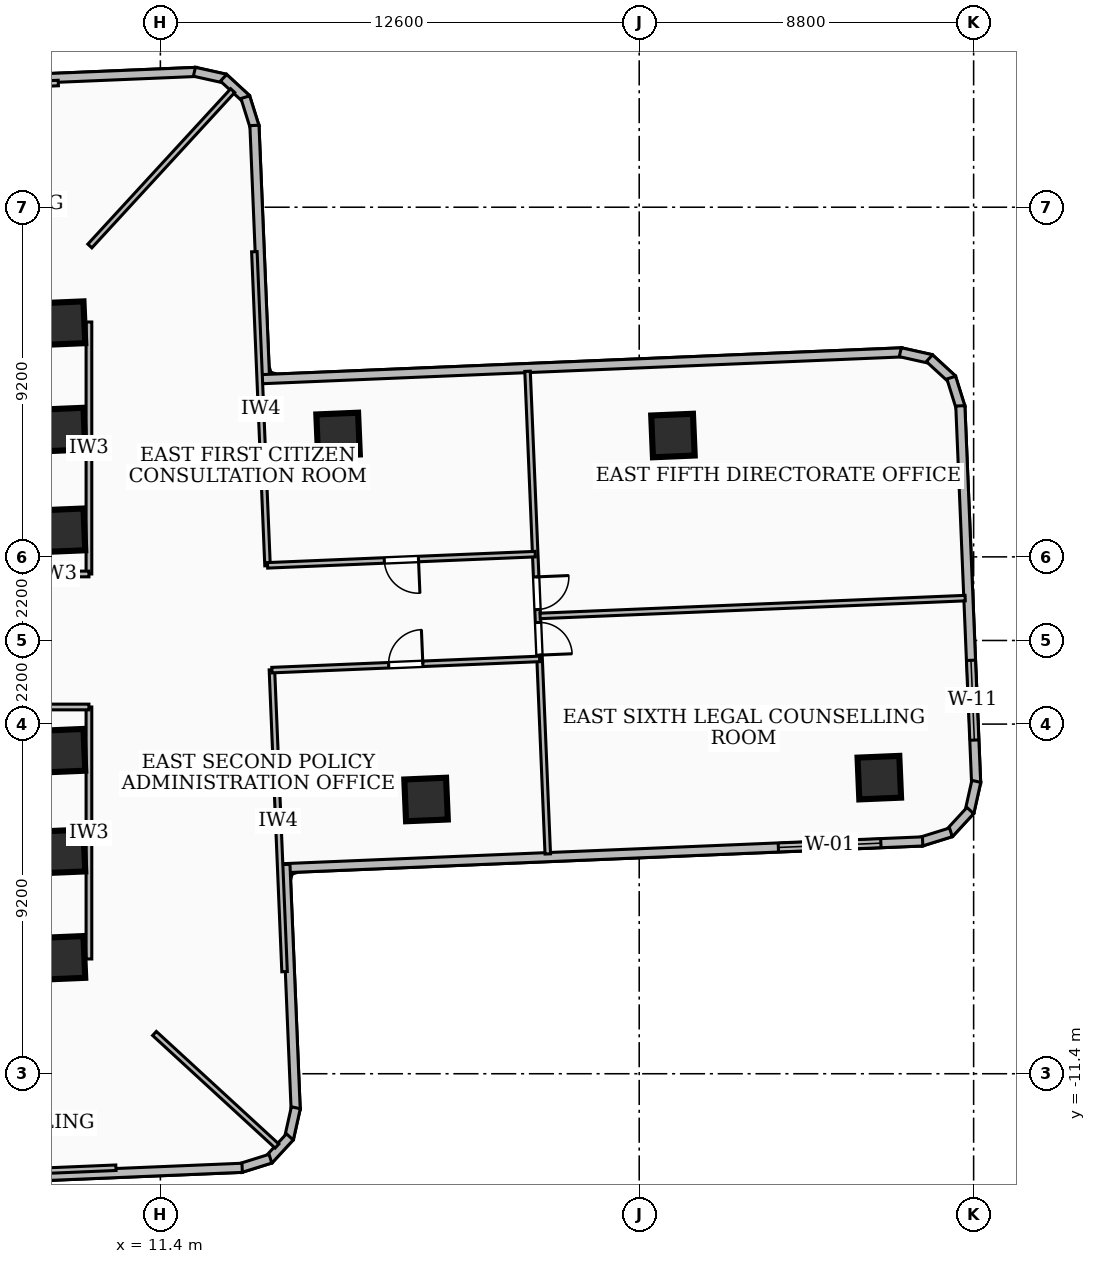
"""IFC4 building model, lengths in metres.
Left out: names, types, materials, properties, quantities, classifications, styles, units other than length and angle.
Written with IfcOpenShell. Run it as: python <this file> out.ifc"""

import sys

from ifc_helpers import new_model, si_unit, direction, frame, frame_2d, origin, origin_2d, place, context, subcontext, project, spatial, rectangle, extrude, element, fill, save


model = new_model("IFC4")
c1 = context("Model", 3, precision=1e-05, world=origin(), true_north=direction((0.0, 1.0)))
c2 = subcontext(c1, "Body", "Model", "MODEL_VIEW")
j1 = project(units=[si_unit("LENGTHUNIT", "METRE"), si_unit("PLANEANGLEUNIT", "RADIAN")], contexts=[c1])
p1 = place(None, origin())
s1 = spatial("IfcSite", under=j1, at=p1, CompositionType="ELEMENT")
p2 = place(p1, origin())
s2 = spatial("IfcBuilding", under=s1, at=p2, CompositionType="ELEMENT")
p3 = place(p2, frame((0.0, 0.0, 46.08)))
s3 = spatial("IfcBuildingStorey", under=s2, at=p3, CompositionType="ELEMENT", Elevation=46.08)
for number, where, z_axis, x_axis in (
    (1, (-8.78, 8.585, 0.0), (0.0, 0.0, 1.0), (1.0, 0.0, 0.0)),
    (2, (8.78, -8.585, 0.0), (0.0, 0.0, 1.0), (-1.0, 0.0, 0.0)),
):
    element("IfcWall", number, at=place(p3, frame(where, z_axis=z_axis, x_axis=x_axis)), inside=s3, PredefinedType="SHEAR", context=c2, shape_type="SweptSolid", body=[
        extrude(rectangle(XDim=17.56, YDim=0.55, at=frame_2d((8.78, 0.0))), origin(), (0.0, 0.0, 1.0), 3.32),
    ])
for number, where, z_axis, x_axis in (
    (3, (8.85, -5.55, 0.0), (0.0, 0.0, 1.0), (0.999, 0.042, 0.0)),
    (4, (8.85, -2.9, 0.0), (0.0, 0.0, 1.0), (0.999, 0.042, 0.0)),
    (5, (8.85, 2.9, 0.0), (0.0, 0.0, 1.0), (0.999, 0.042, 0.0)),
    (6, (8.85, 5.55, 0.0), (0.0, 0.0, 1.0), (0.999, 0.042, 0.0)),
    (7, (8.85, -8.35, 0.0), (0.0, 0.0, 1.0), (0.999, 0.042, 0.0)),
    (8, (8.85, 8.35, 0.0), (0.0, 0.0, 1.0), (0.999, 0.042, 0.0)),
    (9, (18.391, -4.184, 0.0), (0.0, 0.0, 1.0), (0.999, 0.042, 0.0)),
    (10, (16.076, 5.421, 0.0), (0.0, 0.0, 1.0), (0.999, 0.042, 0.0)),
    (11, (30.318, -3.609, 0.0), (0.0, 0.0, 1.0), (0.999, 0.042, 0.0)),
    (12, (24.888, 5.393, 0.0), (0.0, 0.0, 1.0), (0.999, 0.042, 0.0)),
):
    element("IfcColumn", number, at=place(p3, frame(where, z_axis=z_axis, x_axis=x_axis)), inside=s3, PredefinedType="COLUMN", context=c2, shape_type="SweptSolid", body=[
        extrude(rectangle(XDim=1.1, YDim=1.1, at=origin_2d()), origin(), (0.0, 0.0, 1.0), 3.6),
    ])
p4 = place(p3, frame((5.894, 14.69, 0.0), z_axis=(0.0, 0.0, 1.0), x_axis=(0.999124860845, 0.041827173477, 0.0)))
e13 = element("IfcWall", 13, at=p4, inside=s3, PredefinedType="SOLIDWALL", context=c2, shape_type="SweptSolid", body=[
    extrude(rectangle(XDim=6.456, YDim=0.24, at=frame_2d((3.228, 0.0))), origin(), (0.0, 0.0, 1.0), 2.401),
])
p5 = place(p3, frame((12.295, 14.964, 0.0), z_axis=(0.0, 0.0, 1.0), x_axis=(0.976089939158, -0.21736704137, 0.0)))
e14 = element("IfcWall", 14, at=p5, inside=s3, PredefinedType="SOLIDWALL", context=c2, shape_type="SweptSolid", body=[
    extrude(rectangle(XDim=0.829, YDim=0.24, at=frame_2d((0.415, 0.0))), origin(), (0.0, 0.0, 1.0), 3.32),
])
p6 = place(p3, frame((13.062, 14.806, 0.0), z_axis=(0.0, 0.0, 1.0), x_axis=(0.735344259965, -0.677693750404, 0.0)))
e15 = element("IfcWall", 15, at=p6, inside=s3, PredefinedType="SOLIDWALL", context=c2, shape_type="SweptSolid", body=[
    extrude(rectangle(XDim=0.813, YDim=0.24, at=frame_2d((0.406, 0.0))), origin(), (0.0, 0.0, 1.0), 3.32),
])
p7 = place(p3, frame((13.635, 14.296, 0.0), z_axis=(0.0, 0.0, 1.0), x_axis=(0.298542680168, -0.954396284631, 0.0)))
e16 = element("IfcWall", 16, at=p7, inside=s3, PredefinedType="SOLIDWALL", context=c2, shape_type="SweptSolid", body=[
    extrude(rectangle(XDim=0.831, YDim=0.24, at=frame_2d((0.416, 0.0))), origin(), (0.0, 0.0, 1.0), 3.32),
])
p8 = place(p3, frame((13.875, 13.552, 0.0), z_axis=(0.0, 0.0, 1.0), x_axis=(0.041765444226, -0.999127443157, 0.0)))
e17 = element("IfcWall", 17, at=p8, inside=s3, PredefinedType="SOLIDWALL", context=c2, shape_type="SweptSolid", body=[
    extrude(rectangle(XDim=6.775, YDim=0.24, at=frame_2d((3.387, 0.0))), origin(), (0.0, 0.0, 1.0), 2.624),
])
p9 = place(p3, frame((14.058, 6.875, 0.0), z_axis=(0.0, 0.0, 1.0), x_axis=(0.999124376175, 0.04183874918, 0.0)))
e18 = element("IfcWall", 18, at=p9, inside=s3, PredefinedType="SOLIDWALL", context=c2, shape_type="SweptSolid", body=[
    extrude(rectangle(XDim=16.876, YDim=0.24, at=frame_2d((8.438, 0.0))), origin(), (0.0, 0.0, 1.0), 2.624),
])
p10 = place(p3, frame((30.87, 7.585, 0.0), z_axis=(0.0, 0.0, 1.0), x_axis=(0.976138507006, -0.217148831773, 0.0)))
e19 = element("IfcWall", 19, at=p10, inside=s3, PredefinedType="SOLIDWALL", context=c2, shape_type="SweptSolid", body=[
    extrude(rectangle(XDim=0.829, YDim=0.24, at=frame_2d((0.414, 0.0))), origin(), (0.0, 0.0, 1.0), 3.32),
])
p11 = place(p3, frame((31.637, 7.427, 0.0), z_axis=(0.0, 0.0, 1.0), x_axis=(0.73603262681, -0.676946063044, 0.0)))
e20 = element("IfcWall", 20, at=p11, inside=s3, PredefinedType="SOLIDWALL", context=c2, shape_type="SweptSolid", body=[
    extrude(rectangle(XDim=0.814, YDim=0.24, at=frame_2d((0.407, 0.0))), origin(), (0.0, 0.0, 1.0), 3.32),
])
p12 = place(p3, frame((32.211, 6.917, 0.0), z_axis=(0.0, 0.0, 1.0), x_axis=(0.297805793488, -0.954626476359, 0.0)))
e21 = element("IfcWall", 21, at=p12, inside=s3, PredefinedType="SOLIDWALL", context=c2, shape_type="SweptSolid", body=[
    extrude(rectangle(XDim=0.83, YDim=0.24, at=frame_2d((0.415, 0.0))), origin(), (0.0, 0.0, 1.0), 3.32),
])
p13 = place(p3, frame((32.45, 6.174, 0.0), z_axis=(0.0, 0.0, 1.0), x_axis=(0.041857368543, -0.999123596308, 0.0)))
e22 = element("IfcWall", 22, at=p13, inside=s3, PredefinedType="SOLIDWALL", context=c2, shape_type="SweptSolid", body=[
    extrude(rectangle(XDim=9.939, YDim=0.24, at=frame_2d((4.969, 0.0))), origin(), (0.0, 0.0, 1.0), 3.32),
])
p14 = place(p13, frame((6.702, 0.0, 0.85)))
e23 = element("IfcOpeningElement", 23, at=p14, cuts=e22, PredefinedType="OPENING", context=c2, shape_type="SweptSolid", body=[
    extrude(rectangle(XDim=2.1, YDim=1.6, at=frame_2d((1.05, 0.8))), frame((0.0, 0.13, 0.0), z_axis=(0.0, -1.0, 0.0), x_axis=(1.0, 0.0, 0.0)), (0.0, 0.0, 1.0), 0.26),
])
p15 = place(p3, frame((32.87, -3.707, 0.0), z_axis=(0.0, 0.0, 1.0), x_axis=(-0.21711735544, -0.976145508604, 0.0)))
e24 = element("IfcWall", 24, at=p15, inside=s3, PredefinedType="SOLIDWALL", context=c2, shape_type="SweptSolid", body=[
    extrude(rectangle(XDim=0.83, YDim=0.24, at=frame_2d((0.415, 0.0))), origin(), (0.0, 0.0, 1.0), 3.32),
])
p16 = place(p3, frame((32.712, -4.475, 0.0), z_axis=(0.0, 0.0, 1.0), x_axis=(-0.677693750404, -0.735344259965, 0.0)))
e25 = element("IfcWall", 25, at=p16, inside=s3, PredefinedType="SOLIDWALL", context=c2, shape_type="SweptSolid", body=[
    extrude(rectangle(XDim=0.813, YDim=0.24, at=frame_2d((0.406, 0.0))), origin(), (0.0, 0.0, 1.0), 3.32),
])
p17 = place(p3, frame((32.202, -5.048, 0.0), z_axis=(0.0, 0.0, 1.0), x_axis=(-0.954814146828, -0.297203541393, 0.0)))
e26 = element("IfcWall", 26, at=p17, inside=s3, PredefinedType="SOLIDWALL", context=c2, shape_type="SweptSolid", body=[
    extrude(rectangle(XDim=0.831, YDim=0.24, at=frame_2d((0.415, 0.0))), origin(), (0.0, 0.0, 1.0), 3.32),
])
p18 = place(p3, frame((31.458, -5.287, 0.0), z_axis=(0.0, 0.0, 1.0), x_axis=(-0.999122484842, -0.041883890494, 0.0)))
e27 = element("IfcWall", 27, at=p18, inside=s3, PredefinedType="SOLIDWALL", context=c2, shape_type="SweptSolid", body=[
    extrude(rectangle(XDim=16.875, YDim=0.24, at=frame_2d((8.438, 0.0))), origin(), (0.0, 0.0, 1.0), 3.32),
])
p19 = place(p18, frame((1.1, 0.0, 0.85)))
e28 = element("IfcOpeningElement", 28, at=p19, cuts=e27, PredefinedType="OPENING", context=c2, shape_type="SweptSolid", body=[
    extrude(rectangle(XDim=2.7, YDim=2.1, at=frame_2d((1.35, 1.05))), frame((0.0, 0.13, 0.0), z_axis=(0.0, -1.0, 0.0), x_axis=(1.0, 0.0, 0.0)), (0.0, 0.0, 1.0), 0.26),
])
p20 = place(p3, frame((14.69, -5.894, 0.0), z_axis=(0.0, 0.0, 1.0), x_axis=(0.041827173477, -0.999124860845, 0.0)))
e29 = element("IfcWall", 29, at=p20, inside=s3, PredefinedType="SOLIDWALL", context=c2, shape_type="SweptSolid", body=[
    extrude(rectangle(XDim=6.456, YDim=0.24, at=frame_2d((3.228, 0.0))), origin(), (0.0, 0.0, 1.0), 3.32),
])
p21 = place(p3, frame((14.964, -12.295, 0.0), z_axis=(0.0, 0.0, 1.0), x_axis=(-0.21736704137, -0.976089939158, 0.0)))
e30 = element("IfcWall", 30, at=p21, inside=s3, PredefinedType="SOLIDWALL", context=c2, shape_type="SweptSolid", body=[
    extrude(rectangle(XDim=0.829, YDim=0.24, at=frame_2d((0.415, 0.0))), origin(), (0.0, 0.0, 1.0), 3.32),
])
p22 = place(p3, frame((14.806, -13.062, 0.0), z_axis=(0.0, 0.0, 1.0), x_axis=(-0.677693750404, -0.735344259965, 0.0)))
e31 = element("IfcWall", 31, at=p22, inside=s3, PredefinedType="SOLIDWALL", context=c2, shape_type="SweptSolid", body=[
    extrude(rectangle(XDim=0.813, YDim=0.24, at=frame_2d((0.406, 0.0))), origin(), (0.0, 0.0, 1.0), 3.32),
])
p23 = place(p3, frame((14.296, -13.635, 0.0), z_axis=(0.0, 0.0, 1.0), x_axis=(-0.954396284631, -0.298542680168, 0.0)))
e32 = element("IfcWall", 32, at=p23, inside=s3, PredefinedType="SOLIDWALL", context=c2, shape_type="SweptSolid", body=[
    extrude(rectangle(XDim=0.831, YDim=0.24, at=frame_2d((0.416, 0.0))), origin(), (0.0, 0.0, 1.0), 3.32),
])
p24 = place(p3, frame((13.552, -13.875, 0.0), z_axis=(0.0, 0.0, 1.0), x_axis=(-0.999127443157, -0.041765444226, 0.0)))
e33 = element("IfcWall", 33, at=p24, inside=s3, PredefinedType="SOLIDWALL", context=c2, shape_type="SweptSolid", body=[
    extrude(rectangle(XDim=6.775, YDim=0.24, at=frame_2d((3.387, 0.0))), origin(), (0.0, 0.0, 1.0), 3.32),
])
p25 = place(p3, frame((9.52, 1.75, 0.0), z_axis=(0.0, 0.0, 1.0), x_axis=(0.0, 1.0, 0.0)))
e34 = element("IfcWall", 34, at=p25, inside=s3, PredefinedType="PARTITIONING", context=c2, shape_type="SweptSolid", body=[
    extrude(rectangle(XDim=6.63, YDim=0.15, at=frame_2d((3.315, 0.0))), origin(), (0.0, 0.0, 1.0), 2.401),
])
p26 = place(p3, frame((7.85, 1.75, 0.0), z_axis=(0.0, 0.0, 1.0), x_axis=(1.0, 0.0, 0.0)))
e35 = element("IfcWall", 35, at=p26, inside=s3, PredefinedType="PARTITIONING", context=c2, shape_type="SweptSolid", body=[
    extrude(rectangle(XDim=1.67, YDim=0.15, at=frame_2d((0.835, 0.0))), origin(), (0.0, 0.0, 1.0), 2.385),
])
p27 = place(p3, frame((9.52, -8.38, 0.0), z_axis=(0.0, 0.0, 1.0), x_axis=(0.0, 1.0, 0.0)))
e36 = element("IfcWall", 36, at=p27, inside=s3, PredefinedType="PARTITIONING", context=c2, shape_type="SweptSolid", body=[
    extrude(rectangle(XDim=6.63, YDim=0.15, at=frame_2d((3.315, 0.0))), origin(), (0.0, 0.0, 1.0), 2.401),
])
p28 = place(p3, frame((7.85, -1.75, 0.0), z_axis=(0.0, 0.0, 1.0), x_axis=(1.0, 0.0, 0.0)))
e37 = element("IfcWall", 37, at=p28, inside=s3, PredefinedType="PARTITIONING", context=c2, shape_type="SweptSolid", body=[
    extrude(rectangle(XDim=1.67, YDim=0.15, at=frame_2d((0.835, 0.0))), origin(), (0.0, 0.0, 1.0), 2.385),
])
p29 = place(p3, frame((9.544, 10.38, 0.0), z_axis=(0.0, 0.0, 1.0), x_axis=(0.676856513188, 0.736114977809, 0.0)))
e38 = element("IfcWall", 38, at=p29, inside=s3, PredefinedType="PARTITIONING", context=c2, shape_type="SweptSolid", body=[
    extrude(rectangle(XDim=5.554, YDim=0.145, at=frame_2d((2.777, 0.0))), origin(), (0.0, 0.0, 1.0), 2.624),
])
p30 = place(p3, frame((11.245, -10.34, 0.0), z_axis=(0.0, 0.0, 1.0), x_axis=(0.736178820698, -0.676787074312, 0.0)))
e39 = element("IfcWall", 39, at=p30, inside=s3, PredefinedType="PARTITIONING", context=c2, shape_type="SweptSolid", body=[
    extrude(rectangle(XDim=4.378, YDim=0.145, at=frame_2d((2.189, 0.0))), origin(), (0.0, 0.0, 1.0), 3.32),
])
p31 = place(p3, frame((14.22, 1.967, 0.0), z_axis=(0.0, 0.0, 1.0), x_axis=(-0.041948565382, 0.99911977153, 0.0)))
e40 = element("IfcWall", 40, at=p31, inside=s3, PredefinedType="PARTITIONING", context=c2, shape_type="SweptSolid", body=[
    extrude(rectangle(XDim=8.27, YDim=0.145, at=frame_2d((4.135, 0.0))), origin(), (0.0, 0.0, 1.0), 2.401),
])
p32 = place(p3, frame((14.668, -8.714, 0.0), z_axis=(0.0, 0.0, 1.0), x_axis=(-0.041882146625, 0.999122557945, 0.0)))
e41 = element("IfcWall", 41, at=p32, inside=s3, PredefinedType="PARTITIONING", context=c2, shape_type="SweptSolid", body=[
    extrude(rectangle(XDim=7.951, YDim=0.145, at=frame_2d((3.976, 0.0))), origin(), (0.0, 0.0, 1.0), 2.401),
])
p33 = place(p3, frame((21.263, 2.272, 0.0), z_axis=(0.0, 0.0, 1.0), x_axis=(-0.999124408039, -0.041837988246, 0.0)))
e42 = element("IfcWall", 42, at=p33, inside=s3, PredefinedType="PARTITIONING", context=c2, shape_type="SweptSolid", body=[
    extrude(rectangle(XDim=7.049, YDim=0.145, at=frame_2d((3.524, 0.0))), origin(), (0.0, 0.0, 1.0), 3.32),
])
p34 = place(p33, frame((3.074, 0.0, 0.0)))
e43 = element("IfcOpeningElement", 43, at=p34, cuts=e42, PredefinedType="OPENING", context=c2, shape_type="SweptSolid", body=[
    extrude(rectangle(XDim=0.9, YDim=2.06, at=frame_2d((0.45, 1.03))), frame((0.0, 0.083, 0.0), z_axis=(0.0, -1.0, 0.0), x_axis=(1.0, 0.0, 0.0)), (0.0, 0.0, 1.0), 0.165),
])
p35 = place(p3, frame((14.335, -0.78, 0.0), z_axis=(0.0, 0.0, 1.0), x_axis=(0.999124650485, 0.041832198038, 0.0)))
e44 = element("IfcWall", 44, at=p35, inside=s3, PredefinedType="PARTITIONING", context=c2, shape_type="SweptSolid", body=[
    extrude(rectangle(XDim=7.05, YDim=0.145, at=frame_2d((3.525, 0.0))), origin(), (0.0, 0.0, 1.0), 3.32),
])
p36 = place(p35, frame((3.075, 0.0, 0.0)))
e45 = element("IfcOpeningElement", 45, at=p36, cuts=e44, PredefinedType="OPENING", context=c2, shape_type="SweptSolid", body=[
    extrude(rectangle(XDim=0.9, YDim=2.06, at=frame_2d((0.45, 1.03))), frame((0.0, 0.083, 0.0), z_axis=(0.0, -1.0, 0.0), x_axis=(1.0, 0.0, 0.0)), (0.0, 0.0, 1.0), 0.165),
])
p37 = place(p3, frame((21.392, 0.646, 0.0), z_axis=(0.0, 0.0, 1.0), x_axis=(0.999122039379, 0.041894515479, 0.0)))
e46 = element("IfcWall", 46, at=p37, inside=s3, PredefinedType="PARTITIONING", context=c2, shape_type="SweptSolid", body=[
    extrude(rectangle(XDim=11.195, YDim=0.145, at=frame_2d((5.597, 0.0))), origin(), (0.0, 0.0, 1.0), 2.812),
])
p38 = place(p3, frame((21.062, 7.083, 0.0), z_axis=(0.0, 0.0, 1.0), x_axis=(0.041855051962, -0.999123693356, 0.0)))
e47 = element("IfcWall", 47, at=p38, inside=s3, PredefinedType="PARTITIONING", context=c2, shape_type="SweptSolid", body=[
    extrude(rectangle(XDim=12.71, YDim=0.145, at=frame_2d((6.355, 0.0))), origin(), (0.0, 0.0, 1.0), 2.401),
])
p39 = place(p38, frame((6.615, 0.0, 0.0)))
e48 = element("IfcOpeningElement", 48, at=p39, cuts=e47, PredefinedType="OPENING", context=c2, shape_type="SweptSolid", body=[
    extrude(rectangle(XDim=0.86, YDim=2.04, at=frame_2d((0.43, 1.02))), frame((0.0, 0.083, 0.0), z_axis=(0.0, -1.0, 0.0), x_axis=(1.0, 0.0, 0.0)), (0.0, 0.0, 1.0), 0.165),
])
p40 = place(p38, frame((5.415, 0.0, 0.0)))
e49 = element("IfcOpeningElement", 49, at=p40, cuts=e47, PredefinedType="OPENING", context=c2, shape_type="SweptSolid", body=[
    extrude(rectangle(XDim=0.86, YDim=2.04, at=frame_2d((0.43, 1.02))), frame((0.0, 0.083, 0.0), z_axis=(0.0, -1.0, 0.0), x_axis=(1.0, 0.0, 0.0)), (0.0, 0.0, 1.0), 0.165),
])
p41 = place(p3, frame((8.714, 14.668, 0.0), z_axis=(0.0, 0.0, 1.0), x_axis=(-0.999122557945, -0.041882146625, 0.0)))
e50 = element("IfcWall", 50, at=p41, inside=s3, PredefinedType="PARTITIONING", context=c2, shape_type="SweptSolid", body=[
    extrude(rectangle(XDim=7.951, YDim=0.145, at=frame_2d((3.976, 0.0))), origin(), (0.0, 0.0, 1.0), 2.401),
])
p42 = place(p3, frame((1.967, -14.22, 0.0), z_axis=(0.0, 0.0, 1.0), x_axis=(0.99911977153, 0.041948565382, 0.0)))
e51 = element("IfcWall", 51, at=p42, inside=s3, PredefinedType="PARTITIONING", context=c2, shape_type="SweptSolid", body=[
    extrude(rectangle(XDim=8.27, YDim=0.145, at=frame_2d((4.135, 0.0))), origin(), (0.0, 0.0, 1.0), 2.401),
])
p43 = place(p14, origin())
e52 = element("IfcWindow", 52, at=p43, inside=s3, PartitioningType="SINGLE_PANEL", PredefinedType="WINDOW", context=c2, shape_type="SweptSolid", body=[
    extrude(rectangle(XDim=2.1, YDim=1.6, at=frame_2d((1.05, 0.8))), frame((0.0, 0.03, 0.0), z_axis=(0.0, -1.0, 0.0), x_axis=(1.0, 0.0, 0.0)), (0.0, 0.0, 1.0), 0.06),
])
fill(e23, e52)
p44 = place(p19, origin())
e53 = element("IfcWindow", 53, at=p44, inside=s3, PartitioningType="SINGLE_PANEL", PredefinedType="WINDOW", context=c2, shape_type="SweptSolid", body=[
    extrude(rectangle(XDim=2.7, YDim=2.1, at=frame_2d((1.35, 1.05))), frame((0.0, 0.03, 0.0), z_axis=(0.0, -1.0, 0.0), x_axis=(1.0, 0.0, 0.0)), (0.0, 0.0, 1.0), 0.06),
])
fill(e28, e53)
p45 = place(p34, origin())
e54 = element("IfcDoor", 54, at=p45, inside=s3, OperationType="SINGLE_SWING_LEFT", PredefinedType="DOOR", context=c2, shape_type="SweptSolid", body=[
    extrude(rectangle(XDim=0.9, YDim=2.06, at=frame_2d((0.45, 1.03))), frame((0.0, 0.025, 0.0), z_axis=(0.0, -1.0, 0.0), x_axis=(1.0, 0.0, 0.0)), (0.0, 0.0, 1.0), 0.05),
])
fill(e43, e54)
p46 = place(p36, origin())
e55 = element("IfcDoor", 55, at=p46, inside=s3, OperationType="SINGLE_SWING_RIGHT", PredefinedType="DOOR", context=c2, shape_type="SweptSolid", body=[
    extrude(rectangle(XDim=0.9, YDim=2.06, at=frame_2d((0.45, 1.03))), frame((0.0, 0.025, 0.0), z_axis=(0.0, -1.0, 0.0), x_axis=(1.0, 0.0, 0.0)), (0.0, 0.0, 1.0), 0.05),
])
fill(e45, e55)
p47 = place(p39, origin())
e56 = element("IfcDoor", 56, at=p47, inside=s3, OperationType="SINGLE_SWING_RIGHT", PredefinedType="DOOR", context=c2, shape_type="SweptSolid", body=[
    extrude(rectangle(XDim=0.86, YDim=2.04, at=frame_2d((0.43, 1.02))), frame((0.0, 0.025, 0.0), z_axis=(0.0, -1.0, 0.0), x_axis=(1.0, 0.0, 0.0)), (0.0, 0.0, 1.0), 0.05),
])
fill(e48, e56)
p48 = place(p40, origin())
e57 = element("IfcDoor", 57, at=p48, inside=s3, OperationType="SINGLE_SWING_LEFT", PredefinedType="DOOR", context=c2, shape_type="SweptSolid", body=[
    extrude(rectangle(XDim=0.86, YDim=2.04, at=frame_2d((0.43, 1.02))), frame((0.0, 0.025, 0.0), z_axis=(0.0, -1.0, 0.0), x_axis=(1.0, 0.0, 0.0)), (0.0, 0.0, 1.0), 0.05),
])
fill(e49, e57)
save(model, sys.argv[1])
